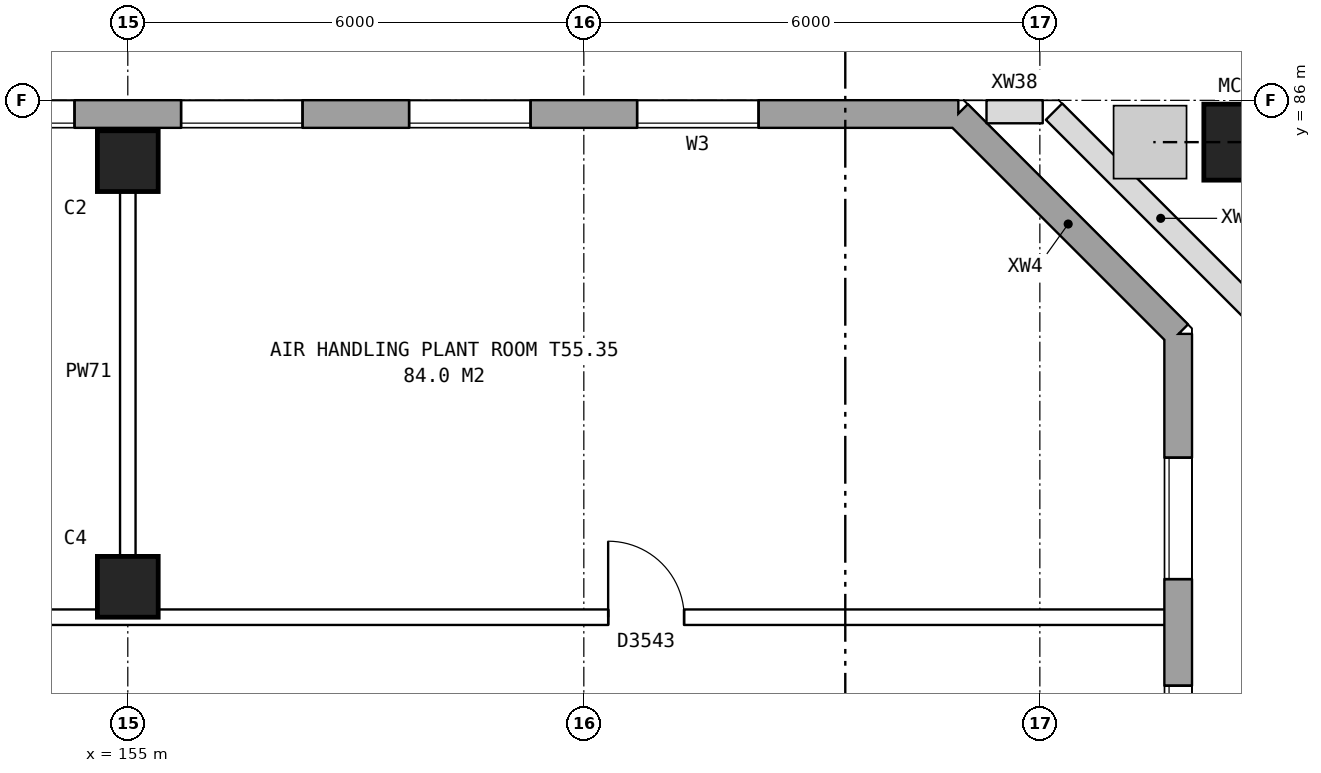
"""IFC4 building model, lengths in metres.
Left out: names, types, materials, properties, quantities, classifications, styles, units other than length and angle.
Written with IfcOpenShell. Run it as: python <this file> out.ifc"""

import sys

from ifc_helpers import new_model, si_unit, direction, frame, frame_2d, origin, origin_2d, place, context, subcontext, project, spatial, rectangle, hollow_rectangle, extrude, element, fill, save


model = new_model("IFC4")
c1 = context("Model", 3, precision=1e-05, world=origin(), true_north=direction((0.0, 1.0)))
c2 = subcontext(c1, "Body", "Model", "MODEL_VIEW")
j1 = project(units=[si_unit("LENGTHUNIT", "METRE"), si_unit("PLANEANGLEUNIT", "RADIAN")], contexts=[c1])
p1 = place(None, origin())
s1 = spatial("IfcSite", under=j1, at=p1, CompositionType="ELEMENT")
p2 = place(p1, origin())
s2 = spatial("IfcBuilding", under=s1, at=p2, CompositionType="ELEMENT")
p3 = place(p2, frame((0.0, 0.0, 194.4)))
s3 = spatial("IfcBuildingStorey", under=s2, at=p3, CompositionType="ELEMENT", Elevation=194.4)
for number, where, z_axis, x_axis in (
    (1, (155.0, 79.6, 0.0), (0.0, 0.0, 1.0), (1.0, 0.0, 0.0)),
    (2, (155.0, 85.2, 0.0), (0.0, 0.0, 1.0), (1.0, 0.0, 0.0)),
):
    element("IfcColumn", number, at=place(p3, frame(where, z_axis=z_axis, x_axis=x_axis)), inside=s3, PredefinedType="COLUMN", context=c2, shape_type="SweptSolid", body=[
        extrude(rectangle(XDim=0.8, YDim=0.8, at=origin_2d()), origin(), (0.0, 0.0, 1.0), 3.95),
    ])
p4 = place(p3, frame((169.658, 85.45, 0.143), z_axis=(-0.285274510918, 0.0, 0.95844585315), x_axis=(0.0, -1.0, 0.0)))
e3 = element("IfcColumn", 3, at=p4, inside=s3, PredefinedType="COLUMN", context=c2, shape_type="SweptSolid", body=[
    extrude(hollow_rectangle(XDim=1.0, YDim=1.0, WallThickness=0.055, at=origin_2d()), origin(), (0.0, 0.0, 1.0), 4.085),
])
p5 = place(p3, frame((168.82, 57.075, 0.0), z_axis=(0.0, 0.0, 1.0), x_axis=(0.0, 1.0, 0.0)))
e4 = element("IfcWall", 4, at=p5, inside=s3, PredefinedType="STANDARD", context=c2, shape_type="SweptSolid", body=[
    extrude(rectangle(XDim=25.851, YDim=0.36, at=frame_2d((12.925, 0.0))), origin(), (0.0, 0.0, 1.0), 3.95),
])
p6 = place(p5, frame((1.625, 0.0, 1.5)))
e5 = element("IfcOpeningElement", 5, at=p6, cuts=e4, PredefinedType="OPENING", context=c2, shape_type="SweptSolid", body=[
    extrude(rectangle(XDim=1.6, YDim=1.2, at=frame_2d((0.8, 0.6))), frame((0.0, 0.19, 0.0), z_axis=(0.0, -1.0, 0.0), x_axis=(1.0, 0.0, 0.0)), (0.0, 0.0, 1.0), 0.38),
])
p7 = place(p5, frame((4.625, 0.0, 1.5)))
e6 = element("IfcOpeningElement", 6, at=p7, cuts=e4, PredefinedType="OPENING", context=c2, shape_type="SweptSolid", body=[
    extrude(rectangle(XDim=1.6, YDim=1.2, at=frame_2d((0.8, 0.6))), frame((0.0, 0.19, 0.0), z_axis=(0.0, -1.0, 0.0), x_axis=(1.0, 0.0, 0.0)), (0.0, 0.0, 1.0), 0.38),
])
p8 = place(p5, frame((19.625, 0.0, 1.5)))
e7 = element("IfcOpeningElement", 7, at=p8, cuts=e4, PredefinedType="OPENING", context=c2, shape_type="SweptSolid", body=[
    extrude(rectangle(XDim=1.6, YDim=1.2, at=frame_2d((0.8, 0.6))), frame((0.0, 0.19, 0.0), z_axis=(0.0, -1.0, 0.0), x_axis=(1.0, 0.0, 0.0)), (0.0, 0.0, 1.0), 0.38),
])
p9 = place(p5, frame((22.625, 0.0, 1.5)))
e8 = element("IfcOpeningElement", 8, at=p9, cuts=e4, PredefinedType="OPENING", context=c2, shape_type="SweptSolid", body=[
    extrude(rectangle(XDim=1.6, YDim=1.2, at=frame_2d((0.8, 0.6))), frame((0.0, 0.19, 0.0), z_axis=(0.0, -1.0, 0.0), x_axis=(1.0, 0.0, 0.0)), (0.0, 0.0, 1.0), 0.38),
])
p10 = place(p3, frame((168.82, 82.925, 0.0), z_axis=(0.0, 0.0, 1.0), x_axis=(-0.707106781187, 0.707106781187, 0.0)))
e9 = element("IfcWall", 9, at=p10, inside=s3, PredefinedType="STANDARD", context=c2, shape_type="SweptSolid", body=[
    extrude(rectangle(XDim=4.094, YDim=0.36, at=frame_2d((2.047, 0.0))), origin(), (0.0, 0.0, 1.0), 3.95),
])
p11 = place(p3, frame((165.925, 85.82, 0.0), z_axis=(0.0, 0.0, 1.0), x_axis=(-1.0, 0.0, 0.0)))
e10 = element("IfcWall", 10, at=p11, inside=s3, PredefinedType="STANDARD", context=c2, shape_type="SweptSolid", body=[
    extrude(rectangle(XDim=33.875, YDim=0.36, at=frame_2d((16.938, 0.0))), origin(), (0.0, 0.0, 1.0), 3.95),
])
p12 = place(p11, frame((2.625, 0.0, 1.5)))
e11 = element("IfcOpeningElement", 11, at=p12, cuts=e10, PredefinedType="OPENING", context=c2, shape_type="SweptSolid", body=[
    extrude(rectangle(XDim=1.6, YDim=1.2, at=frame_2d((0.8, 0.6))), frame((0.0, 0.19, 0.0), z_axis=(0.0, -1.0, 0.0), x_axis=(1.0, 0.0, 0.0)), (0.0, 0.0, 1.0), 0.38),
])
p13 = place(p11, frame((5.625, 0.0, 1.5)))
e12 = element("IfcOpeningElement", 12, at=p13, cuts=e10, PredefinedType="OPENING", context=c2, shape_type="SweptSolid", body=[
    extrude(rectangle(XDim=1.6, YDim=1.2, at=frame_2d((0.8, 0.6))), frame((0.0, 0.19, 0.0), z_axis=(0.0, -1.0, 0.0), x_axis=(1.0, 0.0, 0.0)), (0.0, 0.0, 1.0), 0.38),
])
p14 = place(p11, frame((8.625, 0.0, 1.5)))
e13 = element("IfcOpeningElement", 13, at=p14, cuts=e10, PredefinedType="OPENING", context=c2, shape_type="SweptSolid", body=[
    extrude(rectangle(XDim=1.6, YDim=1.2, at=frame_2d((0.8, 0.6))), frame((0.0, 0.19, 0.0), z_axis=(0.0, -1.0, 0.0), x_axis=(1.0, 0.0, 0.0)), (0.0, 0.0, 1.0), 0.38),
])
p15 = place(p11, frame((11.625, 0.0, 1.5)))
e14 = element("IfcOpeningElement", 14, at=p15, cuts=e10, PredefinedType="OPENING", context=c2, shape_type="SweptSolid", body=[
    extrude(rectangle(XDim=1.6, YDim=1.2, at=frame_2d((0.8, 0.6))), frame((0.0, 0.19, 0.0), z_axis=(0.0, -1.0, 0.0), x_axis=(1.0, 0.0, 0.0)), (0.0, 0.0, 1.0), 0.38),
])
p16 = place(p11, frame((14.625, 0.0, 1.5)))
e15 = element("IfcOpeningElement", 15, at=p16, cuts=e10, PredefinedType="OPENING", context=c2, shape_type="SweptSolid", body=[
    extrude(rectangle(XDim=1.6, YDim=1.2, at=frame_2d((0.8, 0.6))), frame((0.0, 0.19, 0.0), z_axis=(0.0, -1.0, 0.0), x_axis=(1.0, 0.0, 0.0)), (0.0, 0.0, 1.0), 0.38),
])
p17 = place(p11, frame((17.625, 0.0, 1.5)))
e16 = element("IfcOpeningElement", 16, at=p17, cuts=e10, PredefinedType="OPENING", context=c2, shape_type="SweptSolid", body=[
    extrude(rectangle(XDim=1.6, YDim=1.2, at=frame_2d((0.8, 0.6))), frame((0.0, 0.19, 0.0), z_axis=(0.0, -1.0, 0.0), x_axis=(1.0, 0.0, 0.0)), (0.0, 0.0, 1.0), 0.38),
])
p18 = place(p11, frame((20.625, 0.0, 1.5)))
e17 = element("IfcOpeningElement", 17, at=p18, cuts=e10, PredefinedType="OPENING", context=c2, shape_type="SweptSolid", body=[
    extrude(rectangle(XDim=1.6, YDim=1.2, at=frame_2d((0.8, 0.6))), frame((0.0, 0.19, 0.0), z_axis=(0.0, -1.0, 0.0), x_axis=(1.0, 0.0, 0.0)), (0.0, 0.0, 1.0), 0.38),
])
p19 = place(p11, frame((23.625, 0.0, 1.5)))
e18 = element("IfcOpeningElement", 18, at=p19, cuts=e10, PredefinedType="OPENING", context=c2, shape_type="SweptSolid", body=[
    extrude(rectangle(XDim=1.6, YDim=1.2, at=frame_2d((0.8, 0.6))), frame((0.0, 0.19, 0.0), z_axis=(0.0, -1.0, 0.0), x_axis=(1.0, 0.0, 0.0)), (0.0, 0.0, 1.0), 0.38),
])
p20 = place(p11, frame((26.625, 0.0, 1.5)))
e19 = element("IfcOpeningElement", 19, at=p20, cuts=e10, PredefinedType="OPENING", context=c2, shape_type="SweptSolid", body=[
    extrude(rectangle(XDim=1.6, YDim=1.2, at=frame_2d((0.8, 0.6))), frame((0.0, 0.19, 0.0), z_axis=(0.0, -1.0, 0.0), x_axis=(1.0, 0.0, 0.0)), (0.0, 0.0, 1.0), 0.38),
])
p21 = place(p11, frame((29.625, 0.0, 1.5)))
e20 = element("IfcOpeningElement", 20, at=p21, cuts=e10, PredefinedType="OPENING", context=c2, shape_type="SweptSolid", body=[
    extrude(rectangle(XDim=1.6, YDim=1.2, at=frame_2d((0.8, 0.6))), frame((0.0, 0.19, 0.0), z_axis=(0.0, -1.0, 0.0), x_axis=(1.0, 0.0, 0.0)), (0.0, 0.0, 1.0), 0.38),
])
p22 = place(p3, frame((169.992, 83.045, 0.0), z_axis=(0.0, 0.0, 1.0), x_axis=(-0.70707600329, 0.707137557743, 0.0)))
e21 = element("IfcWall", 21, at=p22, inside=s3, PredefinedType="PARAPET", context=c2, shape_type="SweptSolid", body=[
    extrude(rectangle(XDim=3.966, YDim=0.3, at=frame_2d((1.983, 0.0))), origin(), (0.0, 0.0, 1.0), 1.1),
])
p23 = place(p3, frame((167.036, 85.85, 0.0), z_axis=(0.0, 0.0, 1.0), x_axis=(-1.0, 0.0, 0.0)))
e22 = element("IfcWall", 22, at=p23, inside=s3, PredefinedType="PARAPET", context=c2, shape_type="SweptSolid", body=[
    extrude(rectangle(XDim=0.736, YDim=0.3, at=frame_2d((0.368, 0.0))), origin(), (0.0, 0.0, 1.0), 1.1),
])
p24 = place(p3, frame((103.4, 79.2, 0.0), z_axis=(0.0, 0.0, 1.0), x_axis=(1.0, 0.0, 0.0)))
e23 = element("IfcWall", 23, at=p24, inside=s3, PredefinedType="PARTITIONING", context=c2, shape_type="SweptSolid", body=[
    extrude(rectangle(XDim=65.36, YDim=0.2, at=frame_2d((32.68, 0.0))), origin(), (0.0, 0.0, 1.0), 3.95),
])
p25 = place(p24, frame((6.475, 0.0, 0.0)))
e24 = element("IfcOpeningElement", 24, at=p25, cuts=e23, PredefinedType="OPENING", context=c2, shape_type="SweptSolid", body=[
    extrude(rectangle(XDim=1.0, YDim=2.1, at=frame_2d((0.5, 1.05))), frame((0.0, 0.11, 0.0), z_axis=(0.0, -1.0, 0.0), x_axis=(1.0, 0.0, 0.0)), (0.0, 0.0, 1.0), 0.22),
])
p26 = place(p24, frame((20.405, 0.0, 0.0)))
e25 = element("IfcOpeningElement", 25, at=p26, cuts=e23, PredefinedType="OPENING", context=c2, shape_type="SweptSolid", body=[
    extrude(rectangle(XDim=1.0, YDim=2.1, at=frame_2d((0.5, 1.05))), frame((0.0, 0.11, 0.0), z_axis=(0.0, -1.0, 0.0), x_axis=(1.0, 0.0, 0.0)), (0.0, 0.0, 1.0), 0.22),
])
p27 = place(p24, frame((33.28, 0.0, 0.0)))
e26 = element("IfcOpeningElement", 26, at=p27, cuts=e23, PredefinedType="OPENING", context=c2, shape_type="SweptSolid", body=[
    extrude(rectangle(XDim=1.0, YDim=2.1, at=frame_2d((0.5, 1.05))), frame((0.0, 0.11, 0.0), z_axis=(0.0, -1.0, 0.0), x_axis=(1.0, 0.0, 0.0)), (0.0, 0.0, 1.0), 0.22),
])
p28 = place(p24, frame((45.1, 0.0, 0.0)))
e27 = element("IfcOpeningElement", 27, at=p28, cuts=e23, PredefinedType="OPENING", context=c2, shape_type="SweptSolid", body=[
    extrude(rectangle(XDim=1.0, YDim=2.1, at=frame_2d((0.5, 1.05))), frame((0.0, 0.11, 0.0), z_axis=(0.0, -1.0, 0.0), x_axis=(1.0, 0.0, 0.0)), (0.0, 0.0, 1.0), 0.22),
])
p29 = place(p24, frame((57.92, 0.0, 0.0)))
e28 = element("IfcOpeningElement", 28, at=p29, cuts=e23, PredefinedType="OPENING", context=c2, shape_type="SweptSolid", body=[
    extrude(rectangle(XDim=1.0, YDim=2.1, at=frame_2d((0.5, 1.05))), frame((0.0, 0.11, 0.0), z_axis=(0.0, -1.0, 0.0), x_axis=(1.0, 0.0, 0.0)), (0.0, 0.0, 1.0), 0.22),
])
p30 = place(p3, frame((155.0, 79.1, 0.0), z_axis=(0.0, 0.0, 1.0), x_axis=(0.0, 1.0, 0.0)))
e29 = element("IfcWall", 29, at=p30, inside=s3, PredefinedType="PARTITIONING", context=c2, shape_type="SweptSolid", body=[
    extrude(rectangle(XDim=6.66, YDim=0.2, at=frame_2d((3.33, 0.0))), origin(), (0.0, 0.0, 1.0), 3.95),
])
p31 = place(p8, origin())
e30 = element("IfcWindow", 30, at=p31, inside=s3, PartitioningType="DOUBLE_PANEL_HORIZONTAL", PredefinedType="WINDOW", context=c2, shape_type="SweptSolid", body=[
    extrude(rectangle(XDim=1.6, YDim=1.2, at=frame_2d((0.8, 0.6))), frame((0.0, 0.15, 0.0), z_axis=(0.0, -1.0, 0.0), x_axis=(1.0, 0.0, 0.0)), (0.0, 0.0, 1.0), 0.06),
])
fill(e7, e30)
p32 = place(p9, origin())
e31 = element("IfcWindow", 31, at=p32, inside=s3, PartitioningType="DOUBLE_PANEL_HORIZONTAL", PredefinedType="WINDOW", context=c2, shape_type="SweptSolid", body=[
    extrude(rectangle(XDim=1.6, YDim=1.2, at=frame_2d((0.8, 0.6))), frame((0.0, 0.15, 0.0), z_axis=(0.0, -1.0, 0.0), x_axis=(1.0, 0.0, 0.0)), (0.0, 0.0, 1.0), 0.06),
])
fill(e8, e31)
p33 = place(p12, origin())
e32 = element("IfcWindow", 32, at=p33, inside=s3, PartitioningType="DOUBLE_PANEL_HORIZONTAL", PredefinedType="WINDOW", context=c2, shape_type="SweptSolid", body=[
    extrude(rectangle(XDim=1.6, YDim=1.2, at=frame_2d((0.8, 0.6))), frame((0.0, 0.15, 0.0), z_axis=(0.0, -1.0, 0.0), x_axis=(1.0, 0.0, 0.0)), (0.0, 0.0, 1.0), 0.06),
])
fill(e11, e32)
p34 = place(p13, origin())
e33 = element("IfcWindow", 33, at=p34, inside=s3, PartitioningType="DOUBLE_PANEL_HORIZONTAL", PredefinedType="WINDOW", context=c2, shape_type="SweptSolid", body=[
    extrude(rectangle(XDim=1.6, YDim=1.2, at=frame_2d((0.8, 0.6))), frame((0.0, 0.15, 0.0), z_axis=(0.0, -1.0, 0.0), x_axis=(1.0, 0.0, 0.0)), (0.0, 0.0, 1.0), 0.06),
])
fill(e12, e33)
p35 = place(p14, origin())
e34 = element("IfcWindow", 34, at=p35, inside=s3, PartitioningType="DOUBLE_PANEL_HORIZONTAL", PredefinedType="WINDOW", context=c2, shape_type="SweptSolid", body=[
    extrude(rectangle(XDim=1.6, YDim=1.2, at=frame_2d((0.8, 0.6))), frame((0.0, 0.15, 0.0), z_axis=(0.0, -1.0, 0.0), x_axis=(1.0, 0.0, 0.0)), (0.0, 0.0, 1.0), 0.06),
])
fill(e13, e34)
p36 = place(p15, origin())
e35 = element("IfcWindow", 35, at=p36, inside=s3, PartitioningType="DOUBLE_PANEL_HORIZONTAL", PredefinedType="WINDOW", context=c2, shape_type="SweptSolid", body=[
    extrude(rectangle(XDim=1.6, YDim=1.2, at=frame_2d((0.8, 0.6))), frame((0.0, 0.15, 0.0), z_axis=(0.0, -1.0, 0.0), x_axis=(1.0, 0.0, 0.0)), (0.0, 0.0, 1.0), 0.06),
])
fill(e14, e35)
p37 = place(p29, origin())
e36 = element("IfcDoor", 36, at=p37, inside=s3, OperationType="SINGLE_SWING_LEFT", PredefinedType="DOOR", context=c2, shape_type="SweptSolid", body=[
    extrude(rectangle(XDim=1.0, YDim=2.1, at=frame_2d((0.5, 1.05))), frame((0.0, 0.025, 0.0), z_axis=(0.0, -1.0, 0.0), x_axis=(1.0, 0.0, 0.0)), (0.0, 0.0, 1.0), 0.05),
])
fill(e28, e36)
save(model, sys.argv[1])
